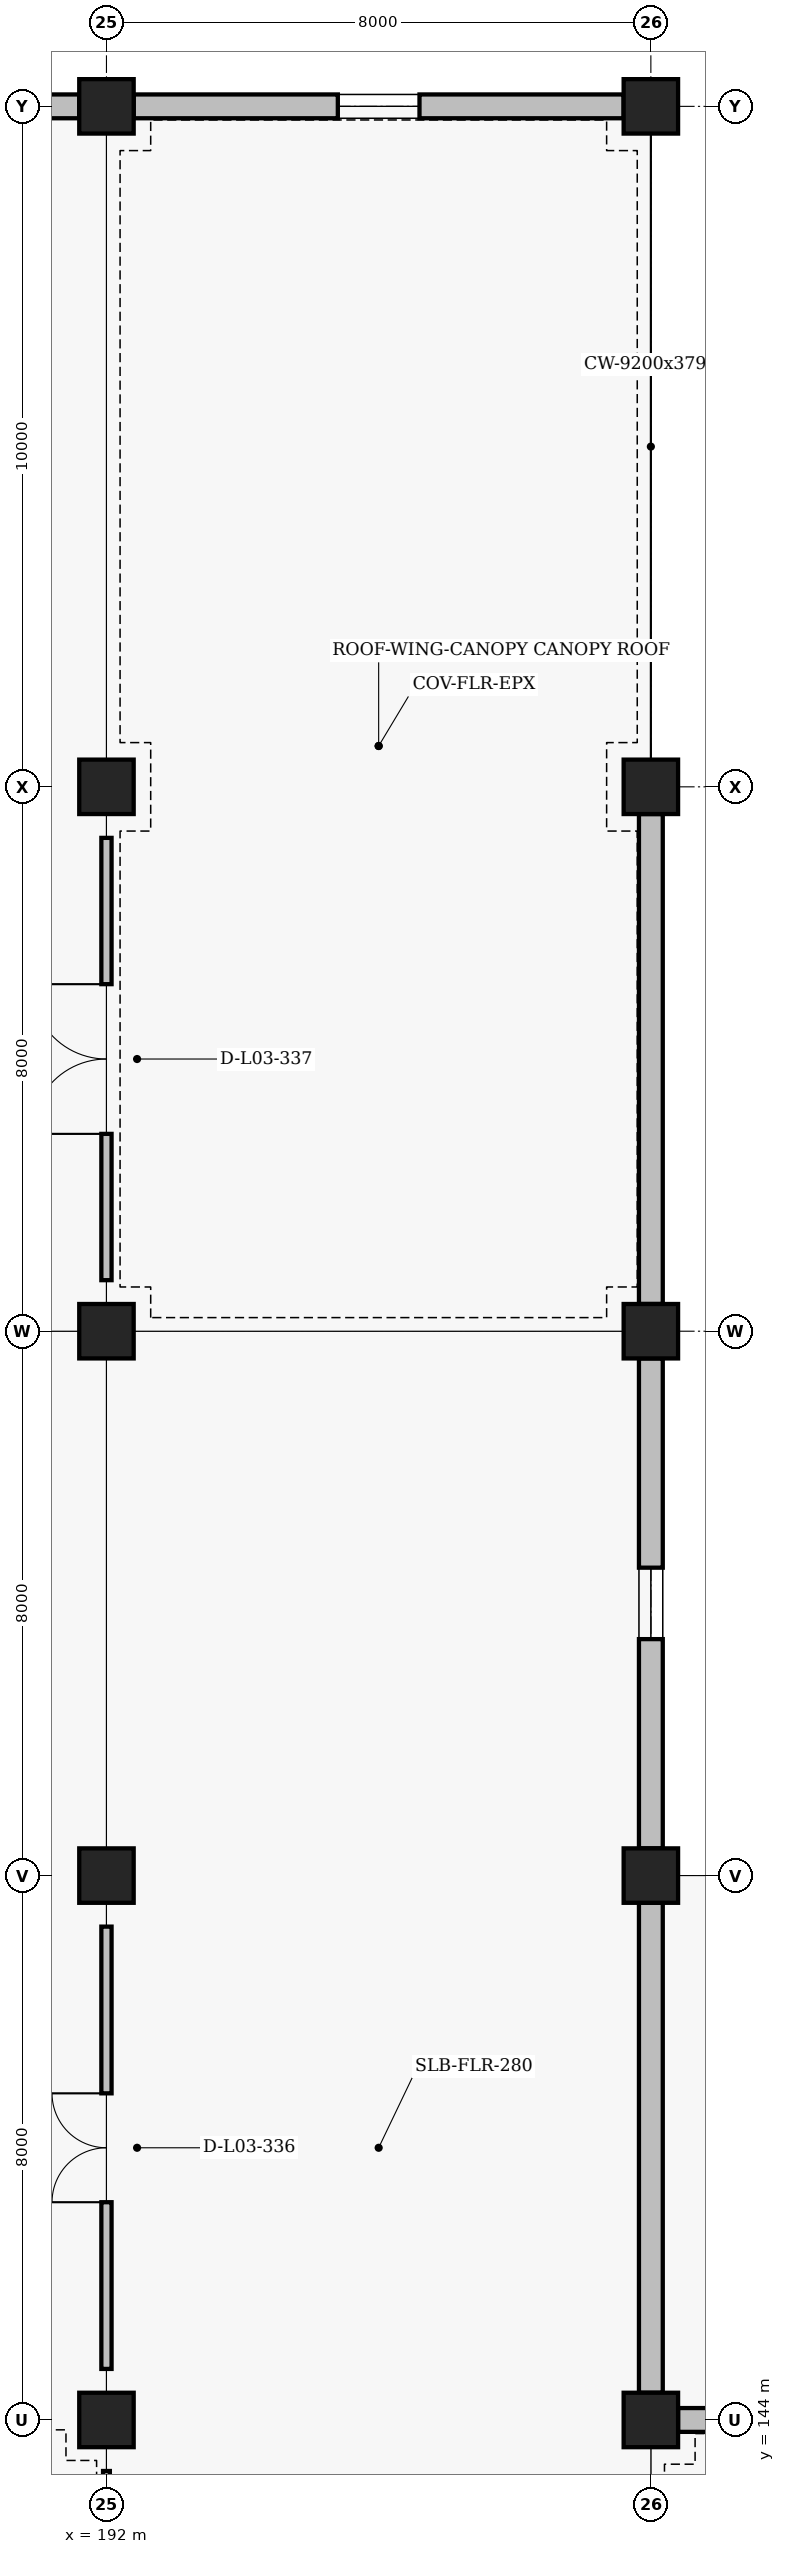
"""IFC4 building model, lengths in metres.
Left out: names, types, materials, properties, quantities, classifications, styles, units other than length and angle.
Written with IfcOpenShell. Run it as: python <this file> out.ifc"""

import sys

from ifc_helpers import new_model, si_unit, direction, frame, frame_2d, origin, origin_2d, place, context, subcontext, project, spatial, rectangle, extrude, element, fill, save


model = new_model("IFC4")
c1 = context("Model", 3, precision=1e-05, world=origin(), true_north=direction((0.0, 1.0)))
c2 = subcontext(c1, "Body", "Model", "MODEL_VIEW")
j1 = project(units=[si_unit("LENGTHUNIT", "METRE"), si_unit("PLANEANGLEUNIT", "RADIAN")], contexts=[c1])
p1 = place(None, origin())
s1 = spatial("IfcSite", under=j1, at=p1, CompositionType="ELEMENT")
p2 = place(p1, origin())
s2 = spatial("IfcBuilding", under=s1, at=p2, CompositionType="ELEMENT")
p3 = place(p2, frame((0.0, 0.0, 9.6)))
s3 = spatial("IfcBuildingStorey", under=s2, at=p3, CompositionType="ELEMENT", Elevation=9.6)
for number, where, z_axis, x_axis in (
    (1, (192.0, 144.0, 0.0), (0.0, 0.0, 1.0), (1.0, 0.0, 0.0)),
    (2, (192.0, 152.0, 0.0), (0.0, 0.0, 1.0), (1.0, 0.0, 0.0)),
    (3, (192.0, 160.0, 0.0), (0.0, 0.0, 1.0), (1.0, 0.0, 0.0)),
    (4, (192.0, 168.0, 0.0), (0.0, 0.0, 1.0), (1.0, 0.0, 0.0)),
    (5, (192.0, 178.0, 0.0), (0.0, 0.0, 1.0), (1.0, 0.0, 0.0)),
    (6, (200.0, 144.0, 0.0), (0.0, 0.0, 1.0), (1.0, 0.0, 0.0)),
    (7, (200.0, 152.0, 0.0), (0.0, 0.0, 1.0), (1.0, 0.0, 0.0)),
    (8, (200.0, 160.0, 0.0), (0.0, 0.0, 1.0), (1.0, 0.0, 0.0)),
    (9, (200.0, 168.0, 0.0), (0.0, 0.0, 1.0), (1.0, 0.0, 0.0)),
    (10, (200.0, 178.0, 0.0), (0.0, 0.0, 1.0), (1.0, 0.0, 0.0)),
):
    element("IfcColumn", number, at=place(p3, frame(where, z_axis=z_axis, x_axis=x_axis)), inside=s3, PredefinedType="COLUMN", context=c2, shape_type="SweptSolid", body=[
        extrude(rectangle(XDim=0.8, YDim=0.8, at=origin_2d()), origin(), (0.0, 0.0, 1.0), 4.8),
    ])
p4 = place(p3, frame((184.4, 178.0, 0.0), z_axis=(0.0, 0.0, 1.0), x_axis=(1.0, 0.0, 0.0)))
e11 = element("IfcWall", 11, at=p4, inside=s3, PredefinedType="SOLIDWALL", context=c2, shape_type="SweptSolid", body=[
    extrude(rectangle(XDim=7.2, YDim=0.35, at=frame_2d((3.6, 0.0))), origin(), (0.0, 0.0, 1.0), 3.59),
])
p5 = place(p3, frame((200.0, 144.4, 0.0), z_axis=(0.0, 0.0, 1.0), x_axis=(0.0, 1.0, 0.0)))
e12 = element("IfcWall", 12, at=p5, inside=s3, PredefinedType="SOLIDWALL", context=c2, shape_type="SweptSolid", body=[
    extrude(rectangle(XDim=7.2, YDim=0.35, at=frame_2d((3.6, 0.0))), origin(), (0.0, 0.0, 1.0), 3.79),
])
p6 = place(p3, frame((200.0, 152.4, 0.0), z_axis=(0.0, 0.0, 1.0), x_axis=(0.0, 1.0, 0.0)))
e13 = element("IfcWall", 13, at=p6, inside=s3, PredefinedType="SOLIDWALL", context=c2, shape_type="SweptSolid", body=[
    extrude(rectangle(XDim=7.2, YDim=0.35, at=frame_2d((3.6, 0.0))), origin(), (0.0, 0.0, 1.0), 3.79),
])
p7 = place(p6, frame((3.075, 0.0, 0.95)))
e14 = element("IfcOpeningElement", 14, at=p7, cuts=e13, PredefinedType="OPENING", context=c2, shape_type="SweptSolid", body=[
    extrude(rectangle(XDim=1.05, YDim=1.5, at=frame_2d((0.525, 0.75))), frame((0.0, 0.185, 0.0), z_axis=(0.0, -1.0, 0.0), x_axis=(1.0, 0.0, 0.0)), (0.0, 0.0, 1.0), 0.37),
])
p8 = place(p3, frame((200.0, 160.4, 0.0), z_axis=(0.0, 0.0, 1.0), x_axis=(0.0, 1.0, 0.0)))
e15 = element("IfcWall", 15, at=p8, inside=s3, PredefinedType="SOLIDWALL", context=c2, shape_type="SweptSolid", body=[
    extrude(rectangle(XDim=7.2, YDim=0.35, at=frame_2d((3.6, 0.0))), origin(), (0.0, 0.0, 1.0), 3.79),
])
p9 = place(p3, frame((192.4, 178.0, 0.0), z_axis=(0.0, 0.0, 1.0), x_axis=(1.0, 0.0, 0.0)))
e16 = element("IfcWall", 16, at=p9, inside=s3, PredefinedType="SOLIDWALL", context=c2, shape_type="SweptSolid", body=[
    extrude(rectangle(XDim=7.2, YDim=0.35, at=frame_2d((3.6, 0.0))), origin(), (0.0, 0.0, 1.0), 3.59),
])
p10 = place(p9, frame((3.0, 0.0, 0.95)))
e17 = element("IfcOpeningElement", 17, at=p10, cuts=e16, PredefinedType="OPENING", context=c2, shape_type="SweptSolid", body=[
    extrude(rectangle(XDim=1.2, YDim=1.5, at=frame_2d((0.6, 0.75))), frame((0.0, 0.185, 0.0), z_axis=(0.0, -1.0, 0.0), x_axis=(1.0, 0.0, 0.0)), (0.0, 0.0, 1.0), 0.37),
])
p11 = place(p3, frame((200.4, 144.0, 0.0), z_axis=(0.0, 0.0, 1.0), x_axis=(1.0, 0.0, 0.0)))
e18 = element("IfcWall", 18, at=p11, inside=s3, PredefinedType="SOLIDWALL", context=c2, shape_type="SweptSolid", body=[
    extrude(rectangle(XDim=7.125, YDim=0.35, at=frame_2d((3.562, 0.0))), origin(), (0.0, 0.0, 1.0), 3.79),
])
p12 = place(p3, frame((192.0, 136.75, 0.0), z_axis=(0.0, 0.0, 1.0), x_axis=(0.0, 1.0, 0.0)))
e19 = element("IfcWall", 19, at=p12, inside=s3, PredefinedType="PARTITIONING", context=c2, shape_type="SweptSolid", body=[
    extrude(rectangle(XDim=6.5, YDim=0.1, at=frame_2d((3.25, 0.0))), origin(), (0.0, 0.0, 1.0), 3.79),
])
p13 = place(p12, frame((2.775, 0.0, 0.0)))
e20 = element("IfcOpeningElement", 20, at=p13, cuts=e19, PredefinedType="OPENING", context=c2, shape_type="SweptSolid", body=[
    extrude(rectangle(XDim=0.95, YDim=2.1, at=frame_2d((0.475, 1.05))), frame((0.0, 0.06, 0.0), z_axis=(0.0, -1.0, 0.0), x_axis=(1.0, 0.0, 0.0)), (0.0, 0.0, 1.0), 0.12),
])
p14 = place(p3, frame((192.0, 144.75, 0.0), z_axis=(0.0, 0.0, 1.0), x_axis=(0.0, 1.0, 0.0)))
e21 = element("IfcWall", 21, at=p14, inside=s3, PredefinedType="PARTITIONING", context=c2, shape_type="SweptSolid", body=[
    extrude(rectangle(XDim=6.5, YDim=0.15, at=frame_2d((3.25, 0.0))), origin(), (0.0, 0.0, 1.0), 3.79),
])
p15 = place(p14, frame((2.45, 0.0, 0.0)))
e22 = element("IfcOpeningElement", 22, at=p15, cuts=e21, PredefinedType="OPENING", context=c2, shape_type="SweptSolid", body=[
    extrude(rectangle(XDim=1.6, YDim=2.2, at=frame_2d((0.8, 1.1))), frame((0.0, 0.085, 0.0), z_axis=(0.0, -1.0, 0.0), x_axis=(1.0, 0.0, 0.0)), (0.0, 0.0, 1.0), 0.17),
])
p16 = place(p3, frame((192.0, 160.75, 0.0), z_axis=(0.0, 0.0, 1.0), x_axis=(0.0, 1.0, 0.0)))
e23 = element("IfcWall", 23, at=p16, inside=s3, PredefinedType="PARTITIONING", context=c2, shape_type="SweptSolid", body=[
    extrude(rectangle(XDim=6.5, YDim=0.15, at=frame_2d((3.25, 0.0))), origin(), (0.0, 0.0, 1.0), 3.79),
])
p17 = place(p16, frame((2.15, 0.0, 0.0)))
e24 = element("IfcOpeningElement", 24, at=p17, cuts=e23, PredefinedType="OPENING", context=c2, shape_type="SweptSolid", body=[
    extrude(rectangle(XDim=2.2, YDim=2.4, at=frame_2d((1.1, 1.2))), frame((0.0, 0.085, 0.0), z_axis=(0.0, -1.0, 0.0), x_axis=(1.0, 0.0, 0.0)), (0.0, 0.0, 1.0), 0.17),
])
p18 = place(p7, origin())
e25 = element("IfcWindow", 25, at=p18, inside=s3, PartitioningType="SINGLE_PANEL", PredefinedType="WINDOW", context=c2, shape_type="SweptSolid", body=[
    extrude(rectangle(XDim=1.05, YDim=1.5, at=frame_2d((0.525, 0.75))), frame((0.0, 0.03, 0.0), z_axis=(0.0, -1.0, 0.0), x_axis=(1.0, 0.0, 0.0)), (0.0, 0.0, 1.0), 0.06),
])
fill(e14, e25)
p19 = place(p10, origin())
e26 = element("IfcWindow", 26, at=p19, inside=s3, PartitioningType="SINGLE_PANEL", PredefinedType="WINDOW", context=c2, shape_type="SweptSolid", body=[
    extrude(rectangle(XDim=1.2, YDim=1.5, at=frame_2d((0.6, 0.75))), frame((0.0, 0.03, 0.0), z_axis=(0.0, -1.0, 0.0), x_axis=(1.0, 0.0, 0.0)), (0.0, 0.0, 1.0), 0.06),
])
fill(e17, e26)
p20 = place(p15, origin())
e27 = element("IfcDoor", 27, at=p20, inside=s3, OperationType="DOUBLE_SWING_LEFT", PredefinedType="DOOR", context=c2, shape_type="SweptSolid", body=[
    extrude(rectangle(XDim=1.6, YDim=2.2, at=frame_2d((0.8, 1.1))), frame((0.0, 0.025, 0.0), z_axis=(0.0, -1.0, 0.0), x_axis=(1.0, 0.0, 0.0)), (0.0, 0.0, 1.0), 0.05),
])
fill(e22, e27)
p21 = place(p17, origin())
e28 = element("IfcDoor", 28, at=p21, inside=s3, OperationType="DOUBLE_SWING_LEFT", PredefinedType="DOOR", context=c2, shape_type="SweptSolid", body=[
    extrude(rectangle(XDim=2.2, YDim=2.4, at=frame_2d((1.1, 1.2))), frame((0.0, 0.025, 0.0), z_axis=(0.0, -1.0, 0.0), x_axis=(1.0, 0.0, 0.0)), (0.0, 0.0, 1.0), 0.05),
])
fill(e24, e28)
save(model, sys.argv[1])
